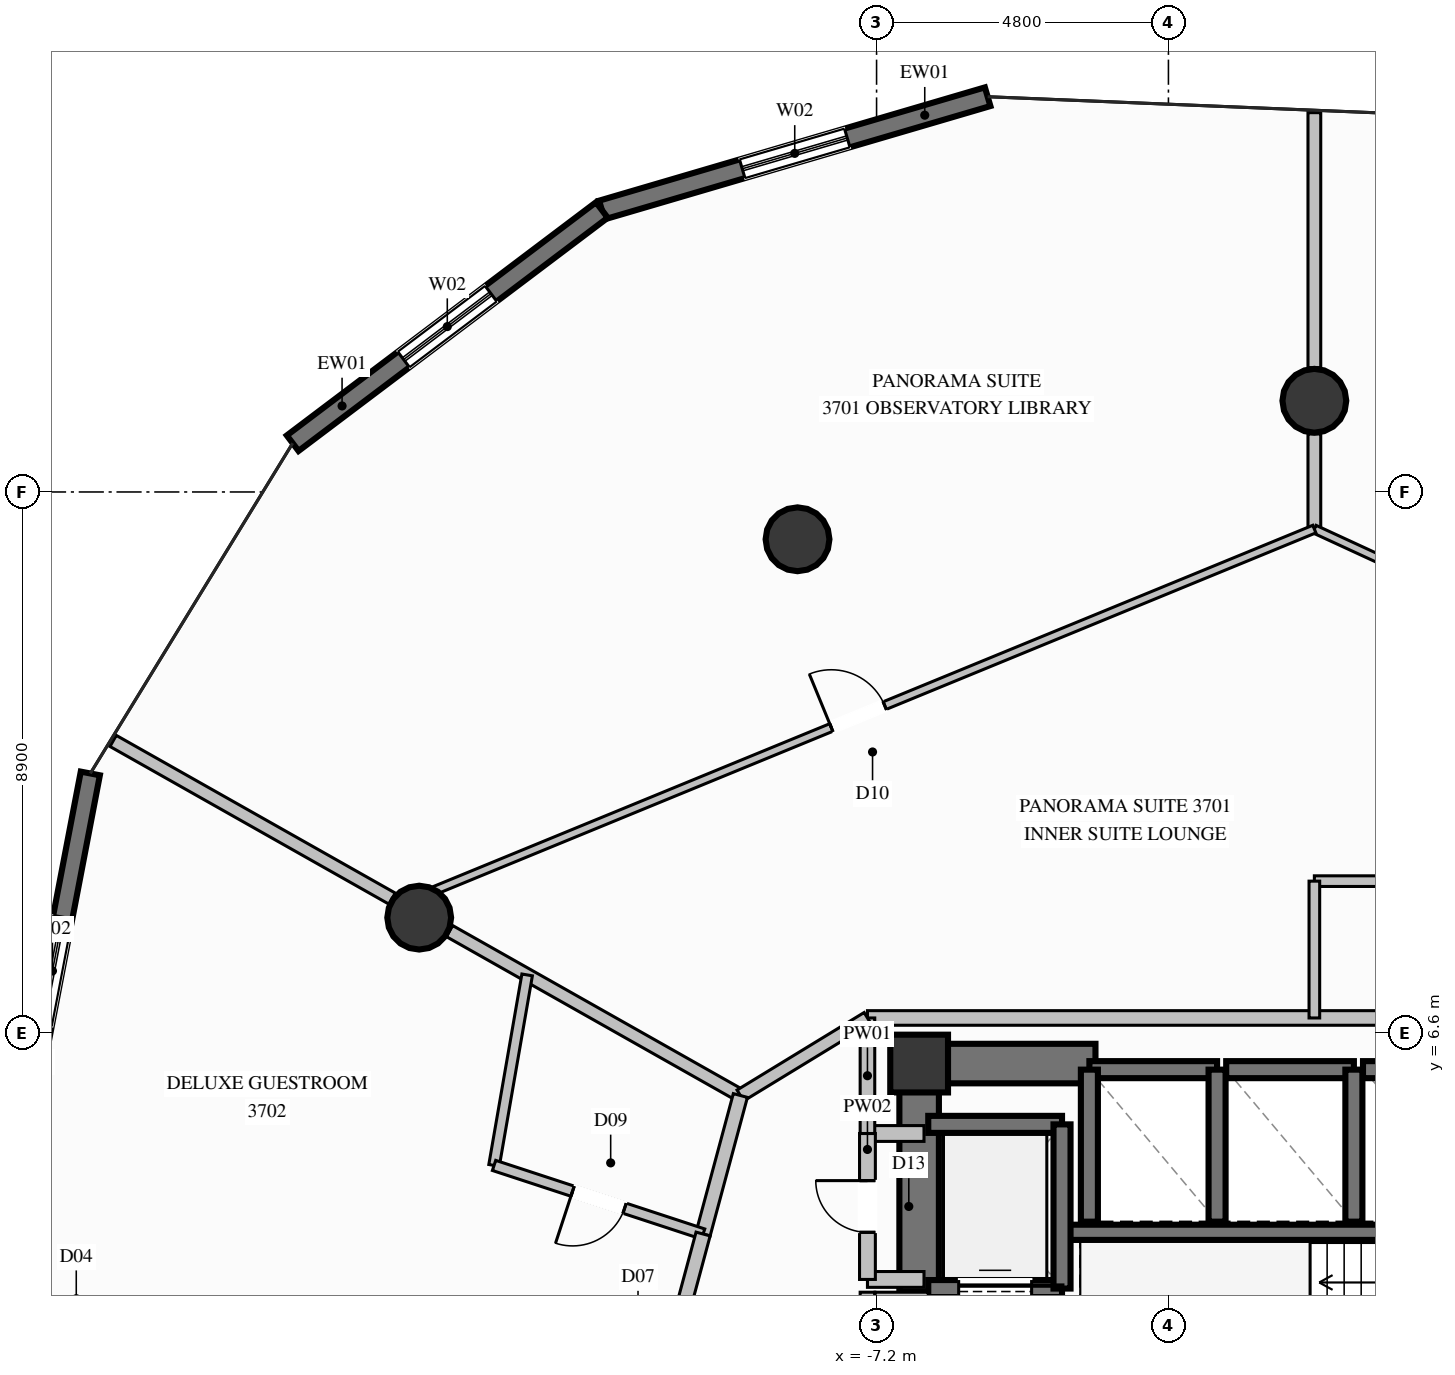
"""IFC4 building model, lengths in metres.
Left out: names, types, materials, properties, quantities, classifications, styles, units other than length and angle.
Written with IfcOpenShell. Run it as: python <this file> out.ifc"""

import sys

from ifc_helpers import new_model, si_unit, direction, frame, frame_2d, origin, origin_2d, place, context, subcontext, project, spatial, rectangle, circle, extrude, element, fill, save


model = new_model("IFC4")
c1 = context("Model", 3, precision=1e-05, world=origin(), true_north=direction((0.0, 1.0)))
c2 = subcontext(c1, "Body", "Model", "MODEL_VIEW")
j1 = project(units=[si_unit("LENGTHUNIT", "METRE"), si_unit("PLANEANGLEUNIT", "RADIAN")], contexts=[c1])
p1 = place(None, origin())
s1 = spatial("IfcSite", under=j1, at=p1, CompositionType="ELEMENT")
p2 = place(p1, origin())
s2 = spatial("IfcBuilding", under=s1, at=p2, CompositionType="ELEMENT")
p3 = place(p2, frame((0.0, 0.0, 138.6)))
s3 = spatial("IfcBuildingStorey", under=s2, at=p3, CompositionType="ELEMENT", Elevation=138.6)
p4 = place(p3, frame((-6.5, 6.1, 0.0), z_axis=(0.0, 0.0, 1.0), x_axis=(1.0, 0.0, 0.0)))
e1 = element("IfcColumn", 1, at=p4, inside=s3, PredefinedType="COLUMN", context=c2, shape_type="SweptSolid", body=[
    extrude(rectangle(XDim=0.95, YDim=0.95, at=origin_2d()), origin(), (0.0, 0.0, 1.0), 3.6),
])
p5 = place(p3, frame((-4.13, 3.325, 0.0), z_axis=(0.0, 0.0, 1.0), x_axis=(1.0, 0.0, 0.0)))
e2 = element("IfcWall", 2, at=p5, inside=s3, PredefinedType="SOLIDWALL", context=c2, shape_type="SweptSolid", body=[
    extrude(rectangle(XDim=8.26, YDim=0.25, at=frame_2d((4.13, 0.0))), origin(), (0.0, 0.0, 1.0), 3.6),
])
p6 = place(p3, frame((-6.175, 6.1, 0.0), z_axis=(0.0, 0.0, 1.0), x_axis=(1.0, 0.0, 0.0)))
e3 = element("IfcWall", 3, at=p6, inside=s3, PredefinedType="SHEAR", context=c2, shape_type="SweptSolid", body=[
    extrude(rectangle(XDim=2.575, YDim=0.65, at=frame_2d((1.288, 0.0))), origin(), (0.0, 0.0, 1.0), 3.6),
])
p7 = place(p3, frame((-6.5, 2.35, 0.0), z_axis=(0.0, 0.0, 1.0), x_axis=(0.0, 1.0, 0.0)))
e4 = element("IfcWall", 4, at=p7, inside=s3, PredefinedType="SHEAR", context=c2, shape_type="SweptSolid", body=[
    extrude(rectangle(XDim=4.075, YDim=0.65, at=frame_2d((2.038, 0.0))), origin(), (0.0, 0.0, 1.0), 3.6),
])
for number, where, z_axis, x_axis in (
    (5, (0.0, 17.0, 0.0), (0.0, 0.0, 1.0), (1.0, 0.0, 0.0)),
    (6, (-8.5, 14.722, 0.0), (0.0, 0.0, 1.0), (1.0, 0.0, 0.0)),
    (7, (-14.722, 8.5, 0.0), (0.0, 0.0, 1.0), (1.0, 0.0, 0.0)),
):
    element("IfcColumn", number, at=place(p3, frame(where, z_axis=z_axis, x_axis=x_axis)), inside=s3, PredefinedType="COLUMN", context=c2, shape_type="SweptSolid", body=[
        extrude(circle(Radius=0.525, at=origin_2d()), origin(), (0.0, 0.0, 1.0), 3.6),
    ])
p8 = place(p3, frame((-11.718, 20.137, 0.0), z_axis=(0.0, 0.0, 1.0), x_axis=(0.959493561685, 0.28173055405, 0.0)))
e8 = element("IfcWall", 8, at=p8, inside=s3, PredefinedType="SOLIDWALL", context=c2, shape_type="SweptSolid", body=[
    extrude(rectangle(XDim=6.613, YDim=0.32, at=frame_2d((3.306, 0.0))), origin(), (0.0, 0.0, 1.0), 3.35),
])
p9 = place(p8, frame((2.406, 0.0, 0.35)))
e9 = element("IfcOpeningElement", 9, at=p9, cuts=e8, PredefinedType="OPENING", context=c2, shape_type="SweptSolid", body=[
    extrude(rectangle(XDim=1.8, YDim=2.6, at=frame_2d((0.9, 1.3))), frame((0.0, 0.17, 0.0), z_axis=(0.0, -1.0, 0.0), x_axis=(1.0, 0.0, 0.0)), (0.0, 0.0, 1.0), 0.34),
])
p10 = place(p3, frame((-16.803, 16.302, 0.0), z_axis=(0.0, 0.0, 1.0), x_axis=(0.798396373417, 0.602132237067, 0.0)))
e10 = element("IfcWall", 10, at=p10, inside=s3, PredefinedType="SOLIDWALL", context=c2, shape_type="SweptSolid", body=[
    extrude(rectangle(XDim=6.369, YDim=0.32, at=frame_2d((3.185, 0.0))), origin(), (0.0, 0.0, 1.0), 3.35),
])
p11 = place(p10, frame((2.285, 0.0, 0.35)))
e11 = element("IfcOpeningElement", 11, at=p11, cuts=e10, PredefinedType="OPENING", context=c2, shape_type="SweptSolid", body=[
    extrude(rectangle(XDim=1.8, YDim=2.6, at=frame_2d((0.9, 1.3))), frame((0.0, 0.17, 0.0), z_axis=(0.0, -1.0, 0.0), x_axis=(1.0, 0.0, 0.0)), (0.0, 0.0, 1.0), 0.34),
])
p12 = place(p3, frame((-21.376, 4.376, 0.0), z_axis=(0.0, 0.0, 1.0), x_axis=(0.188236683123, 0.982123694413, 0.0)))
e12 = element("IfcWall", 12, at=p12, inside=s3, PredefinedType="SOLIDWALL", context=c2, shape_type="SweptSolid", body=[
    extrude(rectangle(XDim=6.613, YDim=0.32, at=frame_2d((3.307, 0.0))), origin(), (0.0, 0.0, 1.0), 3.35),
])
p13 = place(p12, frame((2.407, 0.0, 0.35)))
e13 = element("IfcOpeningElement", 13, at=p13, cuts=e12, PredefinedType="OPENING", context=c2, shape_type="SweptSolid", body=[
    extrude(rectangle(XDim=1.8, YDim=2.6, at=frame_2d((0.9, 1.3))), frame((0.0, 0.17, 0.0), z_axis=(0.0, -1.0, 0.0), x_axis=(1.0, 0.0, 0.0)), (0.0, 0.0, 1.0), 0.34),
])
p14 = place(p3, frame((-20.416, -2.547, 0.0), z_axis=(0.0, 0.0, 1.0), x_axis=(-0.13734656866, 0.990523053784, 0.0)))
e14 = element("IfcWall", 14, at=p14, inside=s3, PredefinedType="SOLIDWALL", context=c2, shape_type="SweptSolid", body=[
    extrude(rectangle(XDim=6.989, YDim=0.32, at=frame_2d((3.495, 0.0))), origin(), (0.0, 0.0, 1.0), 3.35),
])
p15 = place(p14, frame((3.928, 0.0, 0.0)))
e15 = element("IfcOpeningElement", 15, at=p15, cuts=e14, PredefinedType="OPENING", context=c2, shape_type="SweptSolid", body=[
    extrude(rectangle(XDim=1.6, YDim=2.3, at=frame_2d((0.8, 1.15))), frame((0.0, 0.17, 0.0), z_axis=(0.0, -1.0, 0.0), x_axis=(1.0, 0.0, 0.0)), (0.0, 0.0, 1.0), 0.34),
])
p16 = place(p3, frame((-1.6, 6.0, 0.0), z_axis=(0.0, 0.0, 1.0), x_axis=(-1.0, 0.0, 0.0)))
e16 = element("IfcWall", 16, at=p16, inside=s3, PredefinedType="SOLIDWALL", context=c2, shape_type="SweptSolid", body=[
    extrude(rectangle(XDim=2.1, YDim=0.28, at=frame_2d((1.05, 0.0))), origin(), (0.0, 0.0, 1.0), 3.35),
])
for number, where, z_axis, x_axis in (
    (17, (-3.7, 6.0, 0.0), (0.0, 0.0, 1.0), (0.0, -1.0, 0.0)),
    (18, (-1.6, 3.5, 0.0), (0.0, 0.0, 1.0), (0.0, 1.0, 0.0)),
):
    element("IfcWall", number, at=place(p3, frame(where, z_axis=z_axis, x_axis=x_axis)), inside=s3, PredefinedType="SOLIDWALL", context=c2, shape_type="SweptSolid", body=[
        extrude(rectangle(XDim=2.5, YDim=0.28, at=frame_2d((1.25, 0.0))), origin(), (0.0, 0.0, 1.0), 3.35),
    ])
p17 = place(p3, frame((0.65, 6.0, 0.0), z_axis=(0.0, 0.0, 1.0), x_axis=(-1.0, 0.0, 0.0)))
e19 = element("IfcWall", 19, at=p17, inside=s3, PredefinedType="SOLIDWALL", context=c2, shape_type="SweptSolid", body=[
    extrude(rectangle(XDim=2.1, YDim=0.28, at=frame_2d((1.05, 0.0))), origin(), (0.0, 0.0, 1.0), 3.35),
])
p18 = place(p3, frame((0.65, 3.5, 0.0), z_axis=(0.0, 0.0, 1.0), x_axis=(0.0, 1.0, 0.0)))
e20 = element("IfcWall", 20, at=p18, inside=s3, PredefinedType="SOLIDWALL", context=c2, shape_type="SweptSolid", body=[
    extrude(rectangle(XDim=2.5, YDim=0.28, at=frame_2d((1.25, 0.0))), origin(), (0.0, 0.0, 1.0), 3.35),
])
p19 = place(p3, frame((3.0, 6.0, 0.0), z_axis=(0.0, 0.0, 1.0), x_axis=(-1.0, 0.0, 0.0)))
e21 = element("IfcWall", 21, at=p19, inside=s3, PredefinedType="SOLIDWALL", context=c2, shape_type="SweptSolid", body=[
    extrude(rectangle(XDim=2.2, YDim=0.28, at=frame_2d((1.1, 0.0))), origin(), (0.0, 0.0, 1.0), 3.35),
])
p20 = place(p3, frame((-6.35, 2.4, 0.0), z_axis=(0.0, 0.0, 1.0), x_axis=(1.0, 0.0, 0.0)))
e22 = element("IfcWall", 22, at=p20, inside=s3, PredefinedType="SOLIDWALL", context=c2, shape_type="SweptSolid", body=[
    extrude(rectangle(XDim=2.2, YDim=0.28, at=frame_2d((1.1, 0.0))), origin(), (0.0, 0.0, 1.0), 3.35),
])
p21 = place(p20, frame((0.5, 0.0, 0.0)))
e23 = element("IfcOpeningElement", 23, at=p21, cuts=e22, PredefinedType="OPENING", context=c2, shape_type="SweptSolid", body=[
    extrude(rectangle(XDim=1.2, YDim=2.2, at=frame_2d((0.6, 1.1))), frame((0.0, 0.15, 0.0), z_axis=(0.0, -1.0, 0.0), x_axis=(1.0, 0.0, 0.0)), (0.0, 0.0, 1.0), 0.3),
])
p22 = place(p3, frame((-4.15, 5.1, 0.0), z_axis=(0.0, 0.0, 1.0), x_axis=(-1.0, 0.0, 0.0)))
e24 = element("IfcWall", 24, at=p22, inside=s3, PredefinedType="SOLIDWALL", context=c2, shape_type="SweptSolid", body=[
    extrude(rectangle(XDim=2.2, YDim=0.28, at=frame_2d((1.1, 0.0))), origin(), (0.0, 0.0, 1.0), 3.35),
])
p23 = place(p3, frame((-4.15, 2.4, 0.0), z_axis=(0.0, 0.0, 1.0), x_axis=(0.0, 1.0, 0.0)))
e25 = element("IfcWall", 25, at=p23, inside=s3, PredefinedType="SOLIDWALL", context=c2, shape_type="SweptSolid", body=[
    extrude(rectangle(XDim=2.7, YDim=0.28, at=frame_2d((1.35, 0.0))), origin(), (0.0, 0.0, 1.0), 3.35),
])
p24 = place(p3, frame((-7.35, -3.38, 0.0), z_axis=(0.0, 0.0, 1.0), x_axis=(0.0, 1.0, 0.0)))
e26 = element("IfcWall", 26, at=p24, inside=s3, PredefinedType="PARTITIONING", context=c2, shape_type="SweptSolid", body=[
    extrude(rectangle(XDim=5.72, YDim=0.24, at=frame_2d((2.86, 0.0))), origin(), (0.0, 0.0, 1.0), 2.435),
])
p25 = place(p24, frame((1.599, 0.0, 0.0)))
e27 = element("IfcOpeningElement", 27, at=p25, cuts=e26, PredefinedType="OPENING", context=c2, shape_type="SweptSolid", body=[
    extrude(rectangle(XDim=1.15, YDim=2.2, at=frame_2d((0.575, 1.1))), frame((0.0, 0.13, 0.0), z_axis=(0.0, -1.0, 0.0), x_axis=(1.0, 0.0, 0.0)), (0.0, 0.0, 1.0), 0.26),
])
p26 = place(p3, frame((-7.225, 2.21, 0.0), z_axis=(0.0, 0.0, 1.0), x_axis=(1.0, 0.0, 0.0)))
e28 = element("IfcWall", 28, at=p26, inside=s3, PredefinedType="PARTITIONING", context=c2, shape_type="SweptSolid", body=[
    extrude(rectangle(XDim=0.875, YDim=0.26, at=frame_2d((0.438, 0.0))), origin(), (0.0, 0.0, 1.0), 3.35),
])
for number, where, z_axis, x_axis in (
    (29, (-7.35, 4.95, 0.0), (0.0, 0.0, 1.0), (1.0, 0.0, 0.0)),
    (30, (-7.35, 2.55, 0.0), (0.0, 0.0, 1.0), (1.0, 0.0, 0.0)),
):
    element("IfcWall", number, at=place(p3, frame(where, z_axis=z_axis, x_axis=x_axis)), inside=s3, PredefinedType="PARTITIONING", context=c2, shape_type="SweptSolid", body=[
        extrude(rectangle(XDim=0.93, YDim=0.26, at=frame_2d((0.465, 0.0))), origin(), (0.0, 0.0, 1.0), 3.35),
    ])
p27 = place(p3, frame((-7.35, 2.55, 0.0), z_axis=(0.0, 0.0, 1.0), x_axis=(0.0, 1.0, 0.0)))
e31 = element("IfcWall", 31, at=p27, inside=s3, PredefinedType="PARTITIONING", context=c2, shape_type="SweptSolid", body=[
    extrude(rectangle(XDim=2.4, YDim=0.26, at=frame_2d((1.2, 0.0))), origin(), (0.0, 0.0, 1.0), 2.435),
])
p28 = place(p27, frame((0.775, 0.0, 0.0)))
e32 = element("IfcOpeningElement", 32, at=p28, cuts=e31, PredefinedType="OPENING", context=c2, shape_type="SweptSolid", body=[
    extrude(rectangle(XDim=0.85, YDim=2.05, at=frame_2d((0.425, 1.025))), frame((0.0, 0.14, 0.0), z_axis=(0.0, -1.0, 0.0), x_axis=(1.0, 0.0, 0.0)), (0.0, 0.0, 1.0), 0.28),
])
p29 = place(p3, frame((-7.35, 6.85, 0.0), z_axis=(0.0, 0.0, 1.0), x_axis=(1.0, 0.0, 0.0)))
e33 = element("IfcWall", 33, at=p29, inside=s3, PredefinedType="PARTITIONING", context=c2, shape_type="SweptSolid", body=[
    extrude(rectangle(XDim=14.7, YDim=0.24, at=frame_2d((7.35, 0.0))), origin(), (0.0, 0.0, 1.0), 2.435),
])
p30 = place(p3, frame((-7.35, 4.95, 0.0), z_axis=(0.0, 0.0, 1.0), x_axis=(0.0, 1.0, 0.0)))
e34 = element("IfcWall", 34, at=p30, inside=s3, PredefinedType="PARTITIONING", context=c2, shape_type="SweptSolid", body=[
    extrude(rectangle(XDim=1.9, YDim=0.24, at=frame_2d((0.95, 0.0))), origin(), (0.0, 0.0, 1.0), 2.435),
])
p31 = place(p3, frame((-9.44, 5.575, 0.0), z_axis=(0.0, 0.0, 1.0), x_axis=(-0.87056283872, 0.492057256668, 0.0)))
e35 = element("IfcWall", 35, at=p31, inside=s3, PredefinedType="PARTITIONING", context=c2, shape_type="SweptSolid", body=[
    extrude(rectangle(XDim=5.496, YDim=0.21, at=frame_2d((2.748, 0.0))), origin(), (0.0, 0.0, 1.0), 2.791),
])
p32 = place(p3, frame((-15.168, 8.813, 0.0), z_axis=(0.0, 0.0, 1.0), x_axis=(-0.870585270254, 0.492017567997, 0.0)))
e36 = element("IfcWall", 36, at=p32, inside=s3, PredefinedType="PARTITIONING", context=c2, shape_type="SweptSolid", body=[
    extrude(rectangle(XDim=5.27, YDim=0.21, at=frame_2d((2.635, 0.0))), origin(), (0.0, 0.0, 1.0), 3.35),
])
for number, where, z_axis, x_axis in (
    (37, (0.0, 9.1, 0.0), (0.0, 0.0, 1.0), (1.0, 0.0, 0.0)),
    (38, (0.0, 9.1, 0.0), (0.0, 0.0, 1.0), (0.0, -1.0, 0.0)),
):
    element("IfcWall", number, at=place(p3, frame(where, z_axis=z_axis, x_axis=x_axis)), inside=s3, PredefinedType="PLUMBINGWALL", context=c2, shape_type="SweptSolid", body=[
        extrude(rectangle(XDim=2.25, YDim=0.175, at=frame_2d((1.125, 0.0))), origin(), (0.0, 0.0, 1.0), 3.35),
    ])
p33 = place(p3, frame((-9.44, 5.575, 0.0), z_axis=(0.0, 0.0, 1.0), x_axis=(0.853641534933, 0.520860950579, 0.0)))
e39 = element("IfcWall", 39, at=p33, inside=s3, PredefinedType="PARTITIONING", context=c2, shape_type="SweptSolid", body=[
    extrude(rectangle(XDim=2.448, YDim=0.21, at=frame_2d((1.224, 0.0))), origin(), (0.0, 0.0, 1.0), 3.35),
])
p34 = place(p3, frame((0.0, 14.89, 0.0), z_axis=(0.0, 0.0, 1.0), x_axis=(0.0, 1.0, 0.0)))
e40 = element("IfcWall", 40, at=p34, inside=s3, PredefinedType="PARTITIONING", context=c2, shape_type="SweptSolid", body=[
    extrude(rectangle(XDim=1.565, YDim=0.21, at=frame_2d((0.783, 0.0))), origin(), (0.0, 0.0, 1.0), 3.35),
])
p35 = place(p3, frame((0.0, 17.545, 0.0), z_axis=(0.0, 0.0, 1.0), x_axis=(0.0, 1.0, 0.0)))
e41 = element("IfcWall", 41, at=p35, inside=s3, PredefinedType="PARTITIONING", context=c2, shape_type="SweptSolid", body=[
    extrude(rectangle(XDim=4.193, YDim=0.21, at=frame_2d((2.097, 0.0))), origin(), (0.0, 0.0, 1.0), 3.35),
])
p36 = place(p3, frame((0.0, 14.89, 0.0), z_axis=(0.0, 0.0, 1.0), x_axis=(0.908063857852, -0.418831744335, 0.0)))
e42 = element("IfcWall", 42, at=p36, inside=s3, PredefinedType="PARTITIONING", context=c2, shape_type="SweptSolid", body=[
    extrude(rectangle(XDim=15.727, YDim=0.135, at=frame_2d((7.863, 0.0))), origin(), (0.0, 0.0, 1.0), 2.878),
])
p37 = place(p36, frame((7.388, 0.0, 0.0)))
e43 = element("IfcOpeningElement", 43, at=p37, cuts=e42, PredefinedType="OPENING", context=c2, shape_type="SweptSolid", body=[
    extrude(rectangle(XDim=0.95, YDim=2.1, at=frame_2d((0.475, 1.05))), frame((0.0, 0.078, 0.0), z_axis=(0.0, -1.0, 0.0), x_axis=(1.0, 0.0, 0.0)), (0.0, 0.0, 1.0), 0.155),
])
p38 = place(p3, frame((-15.011, 8.724, 0.0), z_axis=(0.0, 0.0, 1.0), x_axis=(0.925008016351, 0.379947588078, 0.0)))
e44 = element("IfcWall", 44, at=p38, inside=s3, PredefinedType="PARTITIONING", context=c2, shape_type="SweptSolid", body=[
    extrude(rectangle(XDim=16.228, YDim=0.135, at=frame_2d((8.114, 0.0))), origin(), (0.0, 0.0, 1.0), 2.878),
])
p39 = place(p38, frame((7.639, 0.0, 0.0)))
e45 = element("IfcOpeningElement", 45, at=p39, cuts=e44, PredefinedType="OPENING", context=c2, shape_type="SweptSolid", body=[
    extrude(rectangle(XDim=0.95, YDim=2.1, at=frame_2d((0.475, 1.05))), frame((0.0, 0.078, 0.0), z_axis=(0.0, -1.0, 0.0), x_axis=(1.0, 0.0, 0.0)), (0.0, 0.0, 1.0), 0.155),
])
p40 = place(p3, frame((-9.44, 5.575, 0.0), z_axis=(0.0, 0.0, 1.0), x_axis=(-0.25988439237, -0.965639737481, 0.0)))
e46 = element("IfcWall", 46, at=p40, inside=s3, PredefinedType="PARTITIONING", context=c2, shape_type="SweptSolid", body=[
    extrude(rectangle(XDim=2.359, YDim=0.24, at=frame_2d((1.179, 0.0))), origin(), (0.0, 0.0, 1.0), 3.35),
])
p41 = place(p3, frame((-12.947, 7.558, 0.0), z_axis=(0.0, 0.0, 1.0), x_axis=(-0.171056041303, -0.985261300739, 0.0)))
e47 = element("IfcWall", 47, at=p41, inside=s3, PredefinedType="PLUMBINGWALL", context=c2, shape_type="SweptSolid", body=[
    extrude(rectangle(XDim=3.18, YDim=0.175, at=frame_2d((1.59, 0.0))), origin(), (0.0, 0.0, 1.0), 3.35),
])
p42 = place(p3, frame((-10.053, 3.297, 0.0), z_axis=(0.0, 0.0, 1.0), x_axis=(-0.950170580303, 0.31173044177, 0.0)))
e48 = element("IfcWall", 48, at=p42, inside=s3, PredefinedType="PLUMBINGWALL", context=c2, shape_type="SweptSolid", body=[
    extrude(rectangle(XDim=3.618, YDim=0.175, at=frame_2d((1.809, 0.0))), origin(), (0.0, 0.0, 1.0), 3.35),
])
p43 = place(p42, frame((1.359, 0.0, 0.0)))
e49 = element("IfcOpeningElement", 49, at=p43, cuts=e48, PredefinedType="OPENING", context=c2, shape_type="SweptSolid", body=[
    extrude(rectangle(XDim=0.9, YDim=2.1, at=frame_2d((0.45, 1.05))), frame((0.0, 0.098, 0.0), z_axis=(0.0, -1.0, 0.0), x_axis=(1.0, 0.0, 0.0)), (0.0, 0.0, 1.0), 0.195),
])
p44 = place(p3, frame((-10.053, 3.297, 0.0), z_axis=(0.0, 0.0, 1.0), x_axis=(-0.25985795735, -0.965646851598, 0.0)))
e50 = element("IfcWall", 50, at=p44, inside=s3, PredefinedType="PARTITIONING", context=c2, shape_type="SweptSolid", body=[
    extrude(rectangle(XDim=3.259, YDim=0.24, at=frame_2d((1.63, 0.0))), origin(), (0.0, 0.0, 1.0), 3.35),
])
p45 = place(p44, frame((1.129, 0.0, 0.0)))
e51 = element("IfcOpeningElement", 51, at=p45, cuts=e50, PredefinedType="OPENING", context=c2, shape_type="SweptSolid", body=[
    extrude(rectangle(XDim=1.0, YDim=2.2, at=frame_2d((0.5, 1.1))), frame((0.0, 0.13, 0.0), z_axis=(0.0, -1.0, 0.0), x_axis=(1.0, 0.0, 0.0)), (0.0, 0.0, 1.0), 0.26),
])
p46 = place(p9, origin())
e52 = element("IfcWindow", 52, at=p46, inside=s3, PartitioningType="SINGLE_PANEL", PredefinedType="WINDOW", context=c2, shape_type="SweptSolid", body=[
    extrude(rectangle(XDim=1.8, YDim=2.6, at=frame_2d((0.9, 1.3))), frame((0.0, 0.03, 0.0), z_axis=(0.0, -1.0, 0.0), x_axis=(1.0, 0.0, 0.0)), (0.0, 0.0, 1.0), 0.06),
])
fill(e9, e52)
p47 = place(p11, origin())
e53 = element("IfcWindow", 53, at=p47, inside=s3, PartitioningType="SINGLE_PANEL", PredefinedType="WINDOW", context=c2, shape_type="SweptSolid", body=[
    extrude(rectangle(XDim=1.8, YDim=2.6, at=frame_2d((0.9, 1.3))), frame((0.0, 0.03, 0.0), z_axis=(0.0, -1.0, 0.0), x_axis=(1.0, 0.0, 0.0)), (0.0, 0.0, 1.0), 0.06),
])
fill(e11, e53)
p48 = place(p13, origin())
e54 = element("IfcWindow", 54, at=p48, inside=s3, PartitioningType="SINGLE_PANEL", PredefinedType="WINDOW", context=c2, shape_type="SweptSolid", body=[
    extrude(rectangle(XDim=1.8, YDim=2.6, at=frame_2d((0.9, 1.3))), frame((0.0, 0.03, 0.0), z_axis=(0.0, -1.0, 0.0), x_axis=(1.0, 0.0, 0.0)), (0.0, 0.0, 1.0), 0.06),
])
fill(e13, e54)
p49 = place(p21, origin())
e55 = element("IfcDoor", 55, at=p49, inside=s3, OperationType="SLIDING_TO_LEFT", PredefinedType="DOOR", context=c2, shape_type="SweptSolid", body=[
    extrude(rectangle(XDim=1.2, YDim=2.2, at=frame_2d((0.6, 1.1))), frame((0.0, 0.025, 0.0), z_axis=(0.0, -1.0, 0.0), x_axis=(1.0, 0.0, 0.0)), (0.0, 0.0, 1.0), 0.05),
])
fill(e23, e55)
p50 = place(p28, origin())
e56 = element("IfcDoor", 56, at=p50, inside=s3, OperationType="SINGLE_SWING_RIGHT", PredefinedType="DOOR", context=c2, shape_type="SweptSolid", body=[
    extrude(rectangle(XDim=0.85, YDim=2.05, at=frame_2d((0.425, 1.025))), frame((0.0, 0.025, 0.0), z_axis=(0.0, -1.0, 0.0), x_axis=(1.0, 0.0, 0.0)), (0.0, 0.0, 1.0), 0.05),
])
fill(e32, e56)
p51 = place(p39, origin())
e57 = element("IfcDoor", 57, at=p51, inside=s3, OperationType="SINGLE_SWING_LEFT", PredefinedType="DOOR", context=c2, shape_type="SweptSolid", body=[
    extrude(rectangle(XDim=0.95, YDim=2.1, at=frame_2d((0.475, 1.05))), frame((0.0, 0.025, 0.0), z_axis=(0.0, -1.0, 0.0), x_axis=(1.0, 0.0, 0.0)), (0.0, 0.0, 1.0), 0.05),
])
fill(e45, e57)
p52 = place(p43, origin())
e58 = element("IfcDoor", 58, at=p52, inside=s3, OperationType="SINGLE_SWING_RIGHT", PredefinedType="DOOR", context=c2, shape_type="SweptSolid", body=[
    extrude(rectangle(XDim=0.9, YDim=2.1, at=frame_2d((0.45, 1.05))), frame((0.0, 0.025, 0.0), z_axis=(0.0, -1.0, 0.0), x_axis=(1.0, 0.0, 0.0)), (0.0, 0.0, 1.0), 0.05),
])
fill(e49, e58)
save(model, sys.argv[1])
